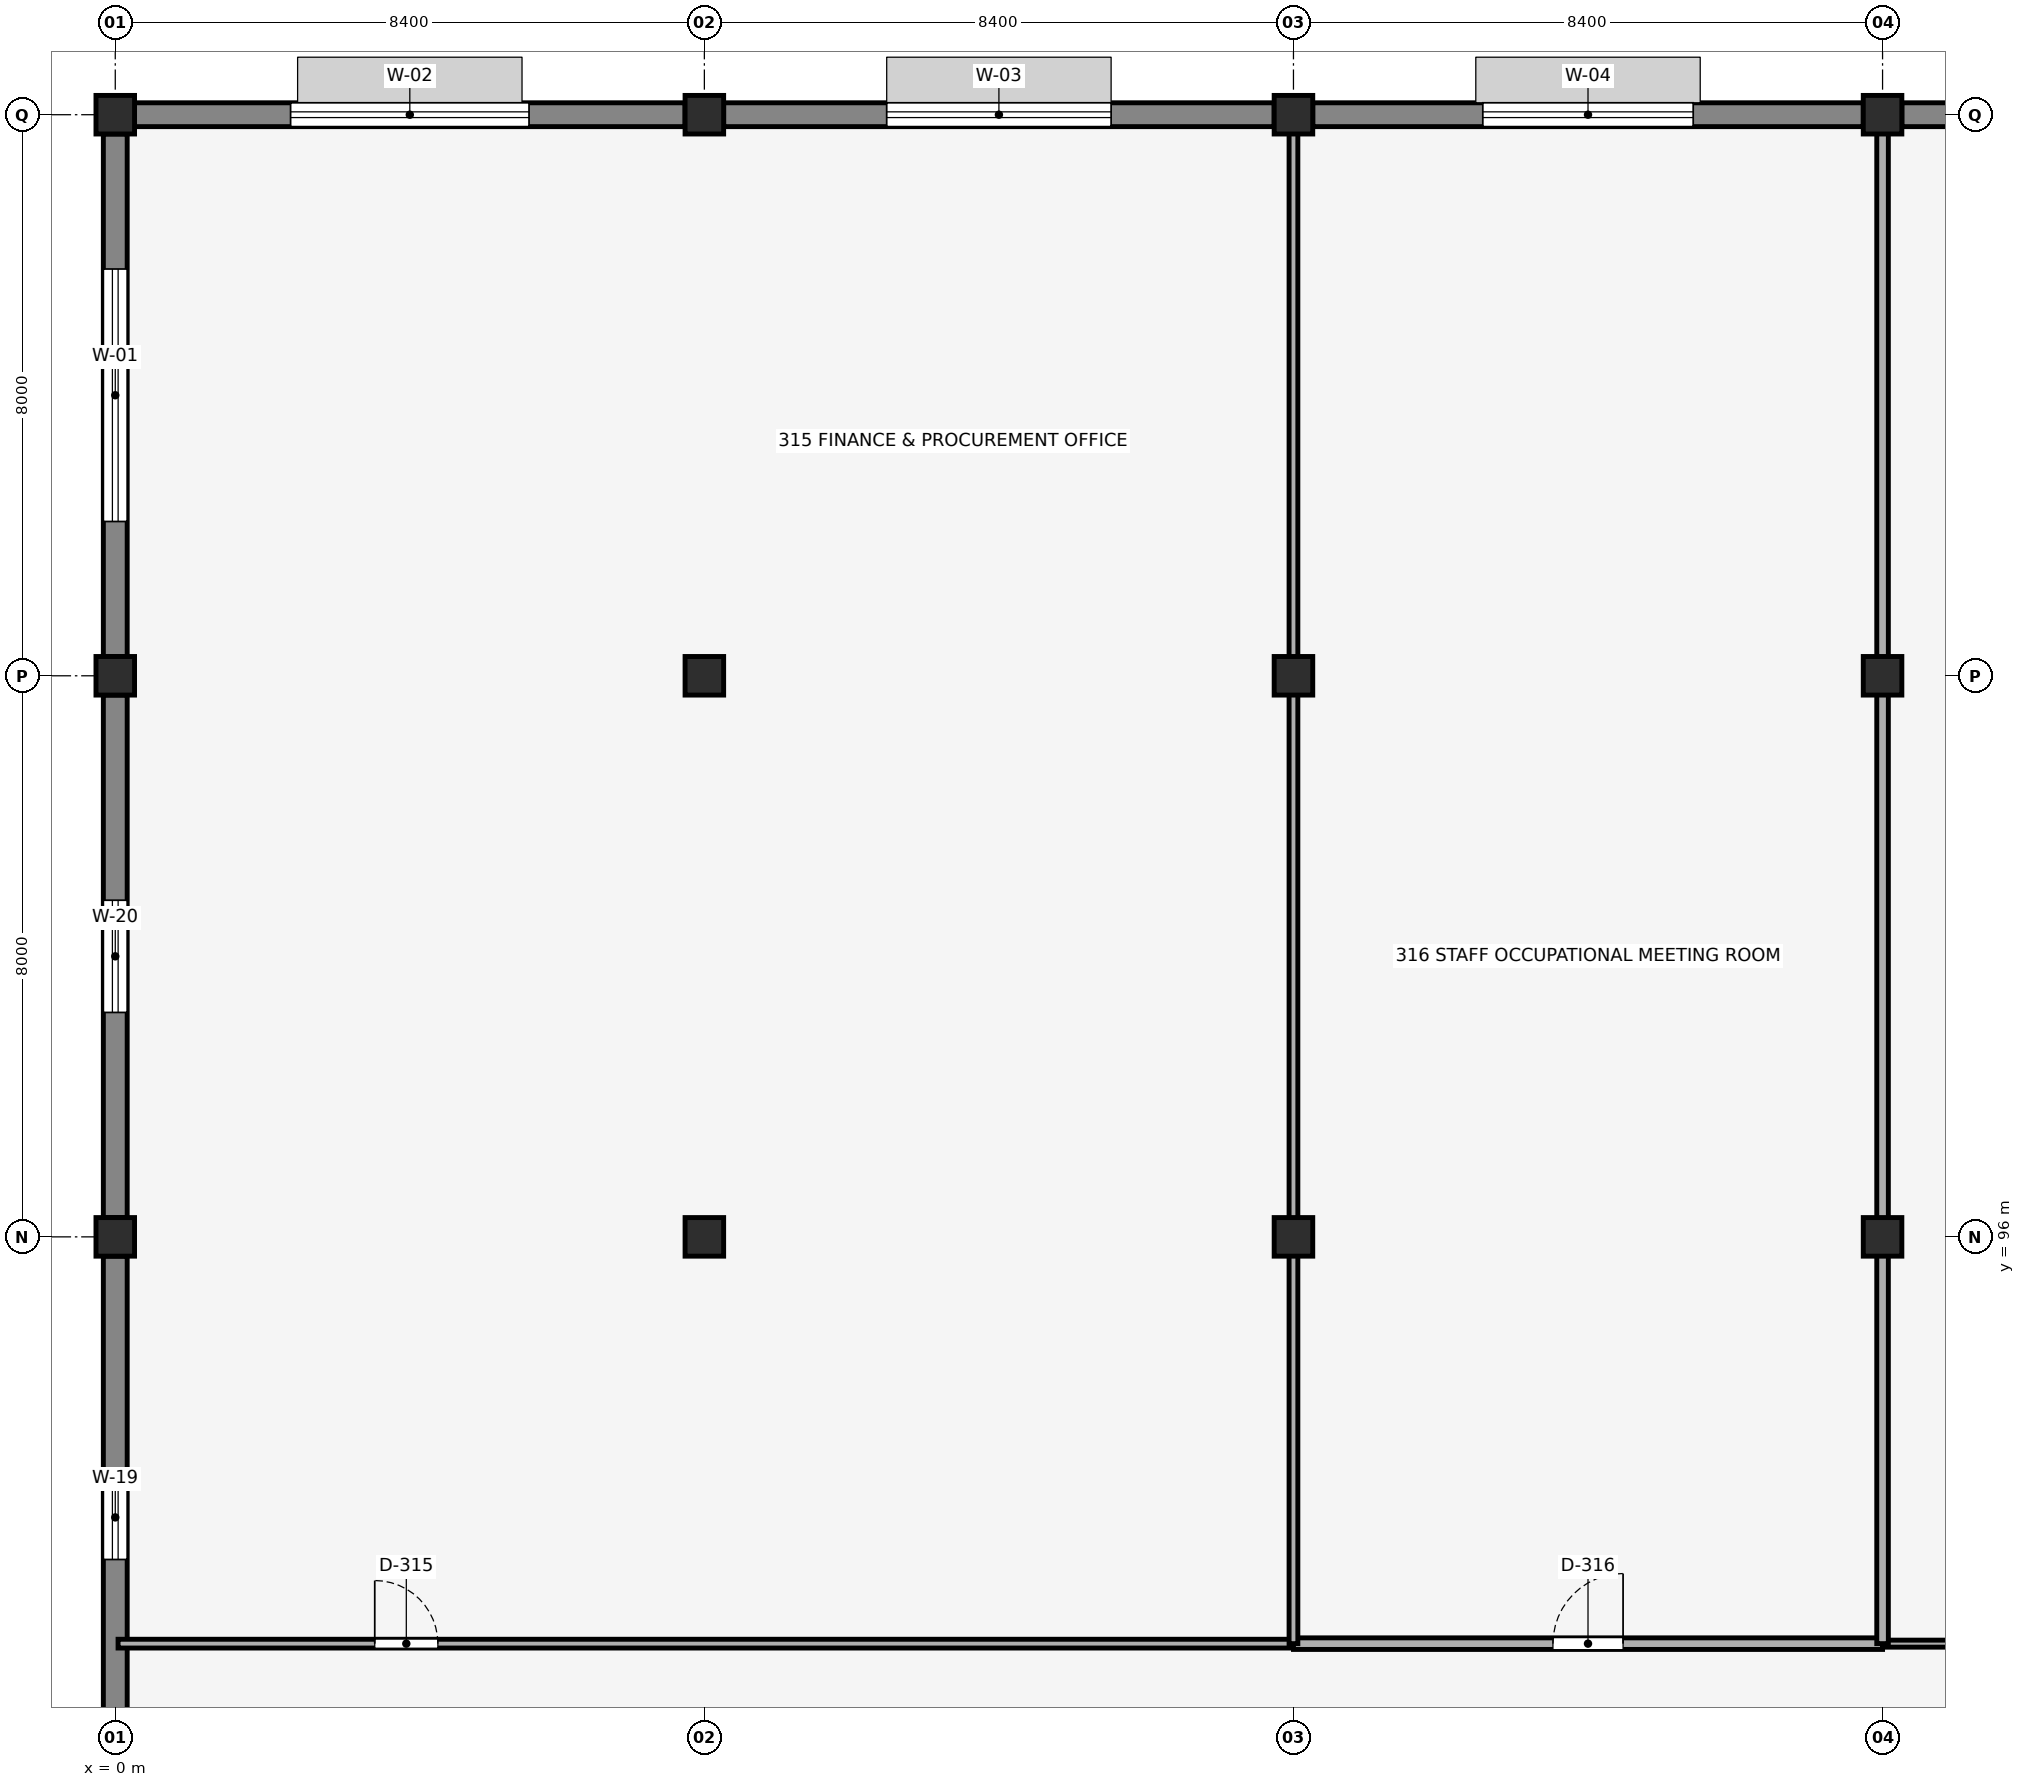
"""IFC4 building model, lengths in metres.
Left out: names, types, materials, properties, quantities, classifications, styles, units other than length and angle.
Written with IfcOpenShell. Run it as: python <this file> out.ifc"""

import sys

from ifc_helpers import new_model, si_unit, direction, frame, frame_2d, origin, origin_2d, place, context, subcontext, project, spatial, rectangle, extrude, element, fill, save


model = new_model("IFC4")
c1 = context("Model", 3, precision=1e-05, world=origin(), true_north=direction((0.0, 1.0)))
c2 = subcontext(c1, "Body", "Model", "MODEL_VIEW")
j1 = project(units=[si_unit("LENGTHUNIT", "METRE"), si_unit("PLANEANGLEUNIT", "RADIAN")], contexts=[c1])
p1 = place(None, origin())
s1 = spatial("IfcSite", under=j1, at=p1, CompositionType="ELEMENT")
p2 = place(p1, origin())
s2 = spatial("IfcBuilding", under=s1, at=p2, CompositionType="ELEMENT")
p3 = place(p2, frame((0.0, 0.0, 13.36)))
s3 = spatial("IfcBuildingStorey", under=s2, at=p3, CompositionType="ELEMENT", Elevation=13.36)
for number, where, z_axis, x_axis in (
    (1, (0.0, 96.0, 0.0), (0.0, 0.0, 1.0), (1.0, 0.0, 0.0)),
    (2, (0.0, 104.0, 0.0), (0.0, 0.0, 1.0), (1.0, 0.0, 0.0)),
    (3, (0.0, 112.0, 0.0), (0.0, 0.0, 1.0), (1.0, 0.0, 0.0)),
    (4, (8.4, 96.0, 0.0), (0.0, 0.0, 1.0), (1.0, 0.0, 0.0)),
    (5, (8.4, 104.0, 0.0), (0.0, 0.0, 1.0), (1.0, 0.0, 0.0)),
    (6, (8.4, 112.0, 0.0), (0.0, 0.0, 1.0), (1.0, 0.0, 0.0)),
    (7, (16.8, 96.0, 0.0), (0.0, 0.0, 1.0), (1.0, 0.0, 0.0)),
    (8, (16.8, 104.0, 0.0), (0.0, 0.0, 1.0), (1.0, 0.0, 0.0)),
    (9, (16.8, 112.0, 0.0), (0.0, 0.0, 1.0), (1.0, 0.0, 0.0)),
    (10, (25.2, 96.0, 0.0), (0.0, 0.0, 1.0), (1.0, 0.0, 0.0)),
    (11, (25.2, 104.0, 0.0), (0.0, 0.0, 1.0), (1.0, 0.0, 0.0)),
    (12, (25.2, 112.0, 0.0), (0.0, 0.0, 1.0), (1.0, 0.0, 0.0)),
):
    element("IfcColumn", number, at=place(p3, frame(where, z_axis=z_axis, x_axis=x_axis)), inside=s3, PredefinedType="COLUMN", context=c2, shape_type="SweptSolid", body=[
        extrude(rectangle(XDim=0.55, YDim=0.55, at=origin_2d()), origin(), (0.0, 0.0, 1.0), 3.58),
    ])
p4 = place(p3, frame((0.0, 88.275, 0.0), z_axis=(0.0, 0.0, 1.0), x_axis=(0.0, 1.0, 0.0)))
e13 = element("IfcWall", 13, at=p4, inside=s3, PredefinedType="SOLIDWALL", context=c2, shape_type="SweptSolid", body=[
    extrude(rectangle(XDim=7.45, YDim=0.34, at=frame_2d((3.725, 0.0))), origin(), (0.0, 0.0, 1.0), 3.28),
])
p5 = place(p4, frame((3.125, 0.0, 1.55), z_axis=(0.0, 0.0, 1.0), x_axis=(1.0, 0.0, 0.0)))
e14 = element("IfcOpeningElement", 14, at=p5, cuts=e13, PredefinedType="OPENING", context=c2, shape_type="SweptSolid", body=[
    extrude(rectangle(XDim=1.2, YDim=0.95, at=frame_2d((0.6, 0.475))), frame((0.0, 0.18, 0.0), z_axis=(0.0, -1.0, 0.0), x_axis=(1.0, 0.0, 0.0)), (0.0, 0.0, 1.0), 0.36),
])
p6 = place(p3, frame((0.0, 96.275, 0.0), z_axis=(0.0, 0.0, 1.0), x_axis=(0.0, 1.0, 0.0)))
e15 = element("IfcWall", 15, at=p6, inside=s3, PredefinedType="SOLIDWALL", context=c2, shape_type="SweptSolid", body=[
    extrude(rectangle(XDim=7.45, YDim=0.34, at=frame_2d((3.725, 0.0))), origin(), (0.0, 0.0, 1.0), 3.28),
])
p7 = place(p6, frame((2.925, 0.0, 0.9), z_axis=(0.0, 0.0, 1.0), x_axis=(1.0, 0.0, 0.0)))
e16 = element("IfcOpeningElement", 16, at=p7, cuts=e15, PredefinedType="OPENING", context=c2, shape_type="SweptSolid", body=[
    extrude(rectangle(XDim=1.6, YDim=1.2, at=frame_2d((0.8, 0.6))), frame((0.0, 0.18, 0.0), z_axis=(0.0, -1.0, 0.0), x_axis=(1.0, 0.0, 0.0)), (0.0, 0.0, 1.0), 0.36),
])
p8 = place(p3, frame((0.0, 104.275, 0.0), z_axis=(0.0, 0.0, 1.0), x_axis=(0.0, 1.0, 0.0)))
e17 = element("IfcWall", 17, at=p8, inside=s3, PredefinedType="SOLIDWALL", context=c2, shape_type="SweptSolid", body=[
    extrude(rectangle(XDim=7.45, YDim=0.34, at=frame_2d((3.725, 0.0))), origin(), (0.0, 0.0, 1.0), 3.28),
])
p9 = place(p8, frame((1.925, 0.0, 0.9), z_axis=(0.0, 0.0, 1.0), x_axis=(1.0, 0.0, 0.0)))
e18 = element("IfcOpeningElement", 18, at=p9, cuts=e17, PredefinedType="OPENING", context=c2, shape_type="SweptSolid", body=[
    extrude(rectangle(XDim=3.6, YDim=1.8, at=frame_2d((1.8, 0.9))), frame((0.0, 0.18, 0.0), z_axis=(0.0, -1.0, 0.0), x_axis=(1.0, 0.0, 0.0)), (0.0, 0.0, 1.0), 0.36),
])
p10 = place(p3, frame((0.275, 112.0, 0.0), z_axis=(0.0, 0.0, 1.0), x_axis=(1.0, 0.0, 0.0)))
e19 = element("IfcWall", 19, at=p10, inside=s3, PredefinedType="SOLIDWALL", context=c2, shape_type="SweptSolid", body=[
    extrude(rectangle(XDim=7.85, YDim=0.34, at=frame_2d((3.925, 0.0))), origin(), (0.0, 0.0, 1.0), 3.28),
])
p11 = place(p10, frame((2.225, 0.0, 0.9), z_axis=(0.0, 0.0, 1.0), x_axis=(1.0, 0.0, 0.0)))
e20 = element("IfcOpeningElement", 20, at=p11, cuts=e19, PredefinedType="OPENING", context=c2, shape_type="SweptSolid", body=[
    extrude(rectangle(XDim=3.4, YDim=1.7, at=frame_2d((1.7, 0.85))), frame((0.0, 0.18, 0.0), z_axis=(0.0, -1.0, 0.0), x_axis=(1.0, 0.0, 0.0)), (0.0, 0.0, 1.0), 0.36),
])
p12 = place(p3, frame((8.675, 112.0, 0.0), z_axis=(0.0, 0.0, 1.0), x_axis=(1.0, 0.0, 0.0)))
e21 = element("IfcWall", 21, at=p12, inside=s3, PredefinedType="SOLIDWALL", context=c2, shape_type="SweptSolid", body=[
    extrude(rectangle(XDim=7.85, YDim=0.34, at=frame_2d((3.925, 0.0))), origin(), (0.0, 0.0, 1.0), 3.28),
])
p13 = place(p12, frame((2.325, 0.0, 0.9), z_axis=(0.0, 0.0, 1.0), x_axis=(1.0, 0.0, 0.0)))
e22 = element("IfcOpeningElement", 22, at=p13, cuts=e21, PredefinedType="OPENING", context=c2, shape_type="SweptSolid", body=[
    extrude(rectangle(XDim=3.2, YDim=1.65, at=frame_2d((1.6, 0.825))), frame((0.0, 0.18, 0.0), z_axis=(0.0, -1.0, 0.0), x_axis=(1.0, 0.0, 0.0)), (0.0, 0.0, 1.0), 0.36),
])
p14 = place(p3, frame((17.075, 112.0, 0.0), z_axis=(0.0, 0.0, 1.0), x_axis=(1.0, 0.0, 0.0)))
e23 = element("IfcWall", 23, at=p14, inside=s3, PredefinedType="SOLIDWALL", context=c2, shape_type="SweptSolid", body=[
    extrude(rectangle(XDim=7.85, YDim=0.34, at=frame_2d((3.925, 0.0))), origin(), (0.0, 0.0, 1.0), 3.28),
])
p15 = place(p14, frame((2.425, 0.0, 0.9), z_axis=(0.0, 0.0, 1.0), x_axis=(1.0, 0.0, 0.0)))
e24 = element("IfcOpeningElement", 24, at=p15, cuts=e23, PredefinedType="OPENING", context=c2, shape_type="SweptSolid", body=[
    extrude(rectangle(XDim=3.0, YDim=1.65, at=frame_2d((1.5, 0.825))), frame((0.0, 0.18, 0.0), z_axis=(0.0, -1.0, 0.0), x_axis=(1.0, 0.0, 0.0)), (0.0, 0.0, 1.0), 0.36),
])
p16 = place(p3, frame((25.475, 112.0, 0.0), z_axis=(0.0, 0.0, 1.0), x_axis=(1.0, 0.0, 0.0)))
e25 = element("IfcWall", 25, at=p16, inside=s3, PredefinedType="SOLIDWALL", context=c2, shape_type="SweptSolid", body=[
    extrude(rectangle(XDim=7.85, YDim=0.34, at=frame_2d((3.925, 0.0))), origin(), (0.0, 0.0, 1.0), 3.28),
])
p17 = place(p16, frame((2.525, 0.0, 0.9), z_axis=(0.0, 0.0, 1.0), x_axis=(1.0, 0.0, 0.0)))
e26 = element("IfcOpeningElement", 26, at=p17, cuts=e25, PredefinedType="OPENING", context=c2, shape_type="SweptSolid", body=[
    extrude(rectangle(XDim=2.8, YDim=1.6, at=frame_2d((1.4, 0.8))), frame((0.0, 0.18, 0.0), z_axis=(0.0, -1.0, 0.0), x_axis=(1.0, 0.0, 0.0)), (0.0, 0.0, 1.0), 0.36),
])
p18 = place(p3, frame((0.04, 90.2, 0.0), z_axis=(0.0, 0.0, 1.0), x_axis=(1.0, 0.0, 0.0)))
e27 = element("IfcWall", 27, at=p18, inside=s3, PredefinedType="PARTITIONING", context=c2, shape_type="SweptSolid", body=[
    extrude(rectangle(XDim=16.76, YDim=0.125, at=frame_2d((8.38, 0.0))), origin(), (0.0, 0.0, 1.0), 3.126),
])
p19 = place(p18, frame((3.66, 0.0, 0.0), z_axis=(0.0, 0.0, 1.0), x_axis=(1.0, 0.0, 0.0)))
e28 = element("IfcOpeningElement", 28, at=p19, cuts=e27, PredefinedType="OPENING", context=c2, shape_type="SweptSolid", body=[
    extrude(rectangle(XDim=0.9, YDim=2.1, at=frame_2d((0.45, 1.05))), frame((0.0, 0.073, 0.0), z_axis=(0.0, -1.0, 0.0), x_axis=(1.0, 0.0, 0.0)), (0.0, 0.0, 1.0), 0.145),
])
p20 = place(p3, frame((16.8, 90.2, 0.0), z_axis=(0.0, 0.0, 1.0), x_axis=(1.0, 0.0, 0.0)))
e29 = element("IfcWall", 29, at=p20, inside=s3, PredefinedType="PARTITIONING", context=c2, shape_type="SweptSolid", body=[
    extrude(rectangle(XDim=8.4, YDim=0.165, at=frame_2d((4.2, 0.0))), origin(), (0.0, 0.0, 1.0), 3.58),
])
p21 = place(p20, frame((3.7, 0.0, 0.0), z_axis=(0.0, 0.0, 1.0), x_axis=(1.0, 0.0, 0.0)))
e30 = element("IfcOpeningElement", 30, at=p21, cuts=e29, PredefinedType="OPENING", context=c2, shape_type="SweptSolid", body=[
    extrude(rectangle(XDim=1.0, YDim=2.15, at=frame_2d((0.5, 1.075))), frame((0.0, 0.093, 0.0), z_axis=(0.0, -1.0, 0.0), x_axis=(1.0, 0.0, 0.0)), (0.0, 0.0, 1.0), 0.185),
])
p22 = place(p3, frame((25.2, 90.2, 0.0), z_axis=(0.0, 0.0, 1.0), x_axis=(1.0, 0.0, 0.0)))
e31 = element("IfcWall", 31, at=p22, inside=s3, PredefinedType="PARTITIONING", context=c2, shape_type="SweptSolid", body=[
    extrude(rectangle(XDim=16.8, YDim=0.1, at=frame_2d((8.4, 0.0))), origin(), (0.0, 0.0, 1.0), 3.58),
])
p23 = place(p22, frame((3.7, 0.0, 0.0), z_axis=(0.0, 0.0, 1.0), x_axis=(1.0, 0.0, 0.0)))
e32 = element("IfcOpeningElement", 32, at=p23, cuts=e31, PredefinedType="OPENING", context=c2, shape_type="SweptSolid", body=[
    extrude(rectangle(XDim=0.88, YDim=2.1, at=frame_2d((0.44, 1.05))), frame((0.0, 0.06, 0.0), z_axis=(0.0, -1.0, 0.0), x_axis=(1.0, 0.0, 0.0)), (0.0, 0.0, 1.0), 0.12),
])
p24 = place(p3, frame((16.8, 90.2, 0.0), z_axis=(0.0, 0.0, 1.0), x_axis=(0.0, 1.0, 0.0)))
e33 = element("IfcWall", 33, at=p24, inside=s3, PredefinedType="PARTITIONING", context=c2, shape_type="SweptSolid", body=[
    extrude(rectangle(XDim=5.535, YDim=0.125, at=frame_2d((2.768, 0.0))), origin(), (0.0, 0.0, 1.0), 3.126),
])
for number, where, z_axis, x_axis in (
    (34, (16.8, 96.265, 0.0), (0.0, 0.0, 1.0), (0.0, 1.0, 0.0)),
    (35, (16.8, 104.265, 0.0), (0.0, 0.0, 1.0), (0.0, 1.0, 0.0)),
):
    element("IfcWall", number, at=place(p3, frame(where, z_axis=z_axis, x_axis=x_axis)), inside=s3, PredefinedType="PARTITIONING", context=c2, shape_type="SweptSolid", body=[
        extrude(rectangle(XDim=7.47, YDim=0.125, at=frame_2d((3.735, 0.0))), origin(), (0.0, 0.0, 1.0), 3.126),
    ])
p25 = place(p3, frame((25.2, 90.2, 0.0), z_axis=(0.0, 0.0, 1.0), x_axis=(0.0, 1.0, 0.0)))
e36 = element("IfcWall", 36, at=p25, inside=s3, PredefinedType="PARTITIONING", context=c2, shape_type="SweptSolid", body=[
    extrude(rectangle(XDim=5.535, YDim=0.165, at=frame_2d((2.768, 0.0))), origin(), (0.0, 0.0, 1.0), 3.126),
])
for number, where, z_axis, x_axis in (
    (37, (25.2, 96.265, 0.0), (0.0, 0.0, 1.0), (0.0, 1.0, 0.0)),
    (38, (25.2, 104.265, 0.0), (0.0, 0.0, 1.0), (0.0, 1.0, 0.0)),
):
    element("IfcWall", number, at=place(p3, frame(where, z_axis=z_axis, x_axis=x_axis)), inside=s3, PredefinedType="PARTITIONING", context=c2, shape_type="SweptSolid", body=[
        extrude(rectangle(XDim=7.47, YDim=0.165, at=frame_2d((3.735, 0.0))), origin(), (0.0, 0.0, 1.0), 3.126),
    ])
p26 = place(p5, origin())
e39 = element("IfcWindow", 39, at=p26, inside=s3, PartitioningType="SINGLE_PANEL", PredefinedType="WINDOW", context=c2, shape_type="SweptSolid", body=[
    extrude(rectangle(XDim=1.2, YDim=0.95, at=frame_2d((0.6, 0.475))), frame((0.0, 0.03, 0.0), z_axis=(0.0, -1.0, 0.0), x_axis=(1.0, 0.0, 0.0)), (0.0, 0.0, 1.0), 0.06),
])
fill(e14, e39)
p27 = place(p7, origin())
e40 = element("IfcWindow", 40, at=p27, inside=s3, PartitioningType="DOUBLE_PANEL_VERTICAL", PredefinedType="WINDOW", context=c2, shape_type="SweptSolid", body=[
    extrude(rectangle(XDim=1.6, YDim=1.2, at=frame_2d((0.8, 0.6))), frame((0.0, 0.03, 0.0), z_axis=(0.0, -1.0, 0.0), x_axis=(1.0, 0.0, 0.0)), (0.0, 0.0, 1.0), 0.06),
])
fill(e16, e40)
p28 = place(p9, origin())
e41 = element("IfcWindow", 41, at=p28, inside=s3, PartitioningType="TRIPLE_PANEL_VERTICAL", PredefinedType="WINDOW", context=c2, shape_type="SweptSolid", body=[
    extrude(rectangle(XDim=3.6, YDim=1.8, at=frame_2d((1.8, 0.9))), frame((0.0, 0.03, 0.0), z_axis=(0.0, -1.0, 0.0), x_axis=(1.0, 0.0, 0.0)), (0.0, 0.0, 1.0), 0.06),
])
fill(e18, e41)
p29 = place(p11, origin())
e42 = element("IfcWindow", 42, at=p29, inside=s3, PartitioningType="TRIPLE_PANEL_VERTICAL", PredefinedType="WINDOW", context=c2, shape_type="SweptSolid", body=[
    extrude(rectangle(XDim=3.4, YDim=1.7, at=frame_2d((1.7, 0.85))), frame((0.0, 0.03, 0.0), z_axis=(0.0, -1.0, 0.0), x_axis=(1.0, 0.0, 0.0)), (0.0, 0.0, 1.0), 0.06),
])
fill(e20, e42)
p30 = place(p13, origin())
e43 = element("IfcWindow", 43, at=p30, inside=s3, PartitioningType="TRIPLE_PANEL_VERTICAL", PredefinedType="WINDOW", context=c2, shape_type="SweptSolid", body=[
    extrude(rectangle(XDim=3.2, YDim=1.65, at=frame_2d((1.6, 0.825))), frame((0.0, 0.03, 0.0), z_axis=(0.0, -1.0, 0.0), x_axis=(1.0, 0.0, 0.0)), (0.0, 0.0, 1.0), 0.06),
])
fill(e22, e43)
p31 = place(p15, origin())
e44 = element("IfcWindow", 44, at=p31, inside=s3, PartitioningType="DOUBLE_PANEL_VERTICAL", PredefinedType="WINDOW", context=c2, shape_type="SweptSolid", body=[
    extrude(rectangle(XDim=3.0, YDim=1.65, at=frame_2d((1.5, 0.825))), frame((0.0, 0.03, 0.0), z_axis=(0.0, -1.0, 0.0), x_axis=(1.0, 0.0, 0.0)), (0.0, 0.0, 1.0), 0.06),
])
fill(e24, e44)
p32 = place(p19, origin())
e45 = element("IfcDoor", 45, at=p32, inside=s3, OperationType="SINGLE_SWING_LEFT", PredefinedType="DOOR", context=c2, shape_type="SweptSolid", body=[
    extrude(rectangle(XDim=0.9, YDim=2.1, at=frame_2d((0.45, 1.05))), frame((0.0, 0.025, 0.0), z_axis=(0.0, -1.0, 0.0), x_axis=(1.0, 0.0, 0.0)), (0.0, 0.0, 1.0), 0.05),
])
fill(e28, e45)
p33 = place(p21, origin())
e46 = element("IfcDoor", 46, at=p33, inside=s3, OperationType="SINGLE_SWING_RIGHT", PredefinedType="DOOR", context=c2, shape_type="SweptSolid", body=[
    extrude(rectangle(XDim=1.0, YDim=2.15, at=frame_2d((0.5, 1.075))), frame((0.0, 0.025, 0.0), z_axis=(0.0, -1.0, 0.0), x_axis=(1.0, 0.0, 0.0)), (0.0, 0.0, 1.0), 0.05),
])
fill(e30, e46)
save(model, sys.argv[1])
